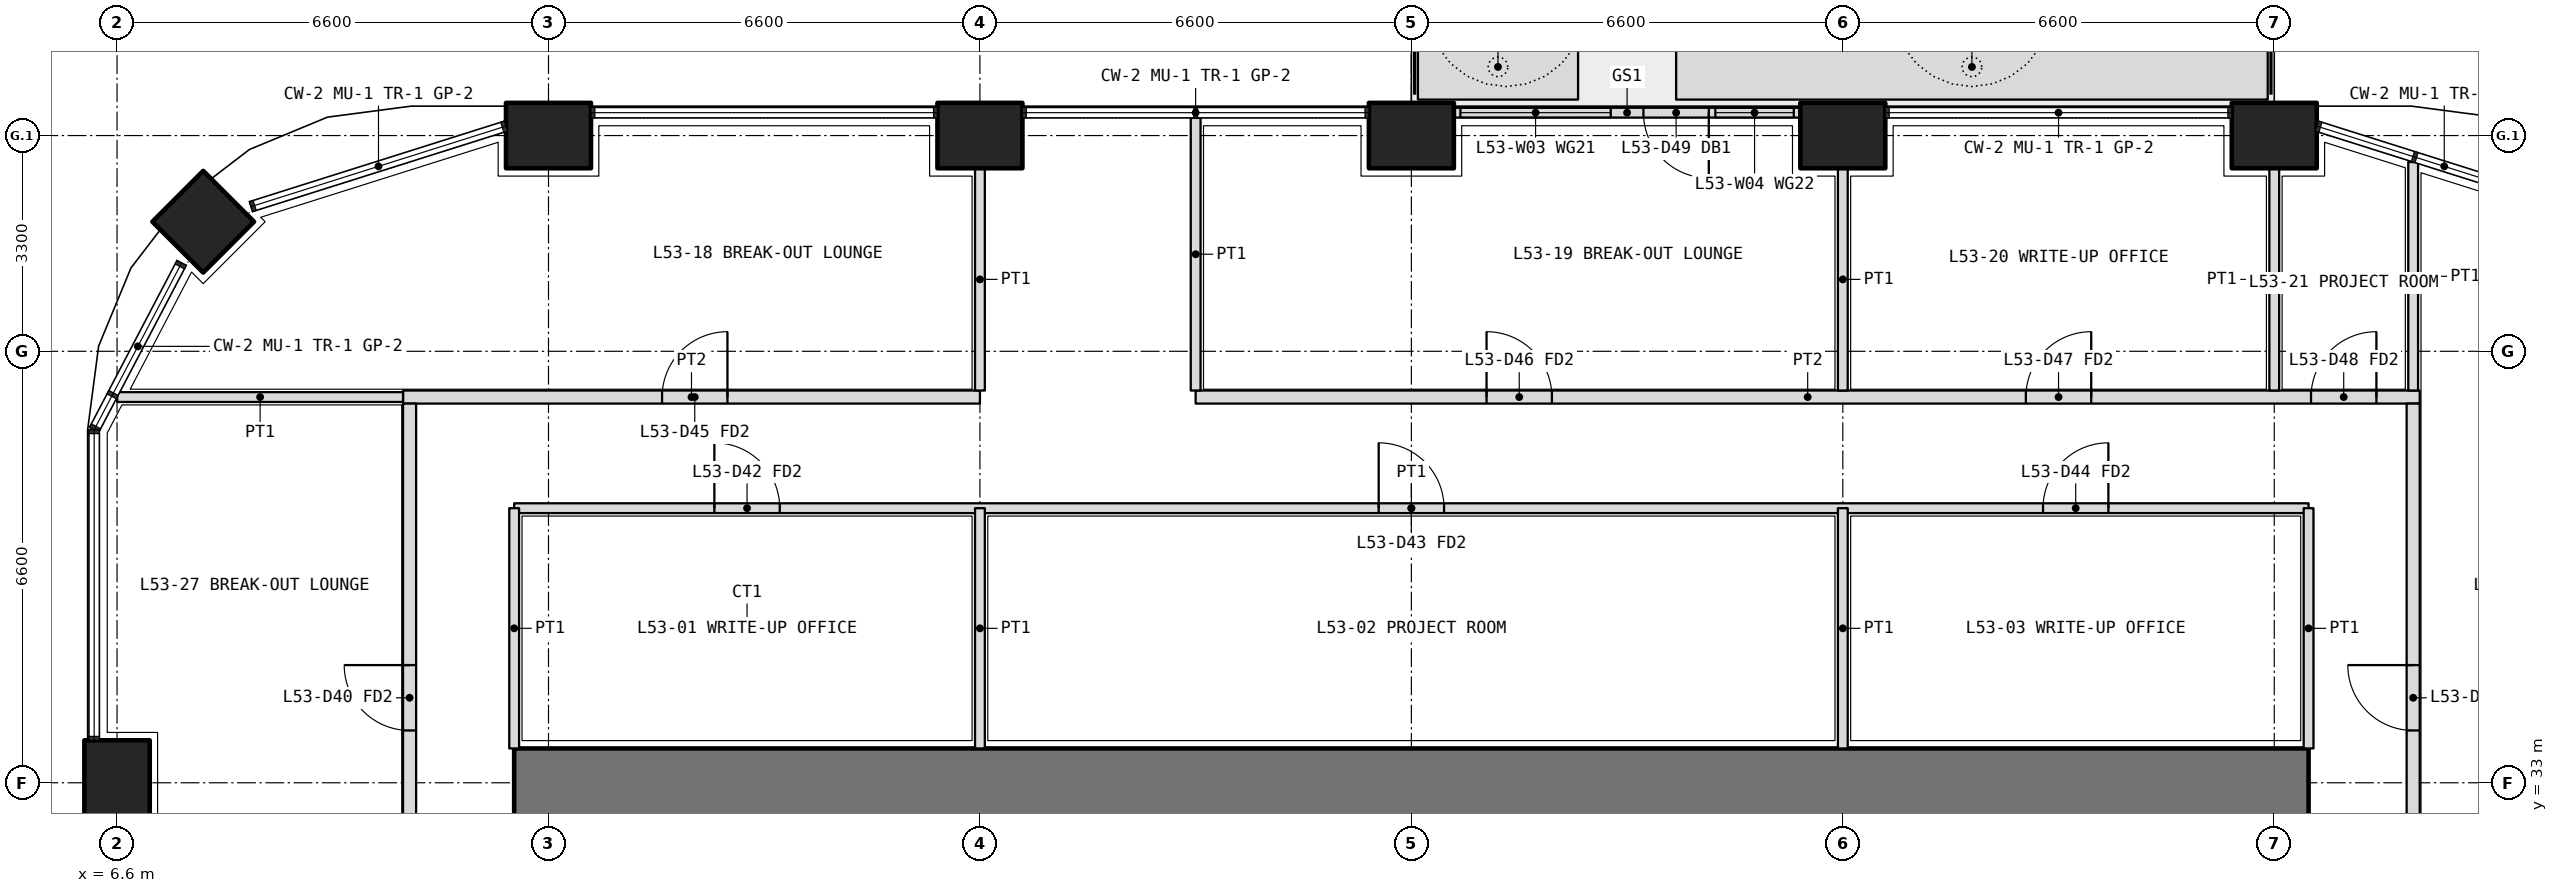
"""IFC4 building model, lengths in metres.
Left out: names, types, materials, properties, quantities, classifications, styles, units other than length and angle.
Written with IfcOpenShell. Run it as: python <this file> out.ifc"""

import sys

from ifc_helpers import new_model, si_unit, direction, frame, frame_2d, origin, origin_2d, place, context, subcontext, project, spatial, polyline, rectangle, outline, extrude, element, fill, save


model = new_model("IFC4")
c1 = context("Model", 3, precision=1e-05, world=origin(), true_north=direction((0.0, 1.0)))
c2 = subcontext(c1, "Body", "Model", "MODEL_VIEW")
j1 = project(units=[si_unit("LENGTHUNIT", "METRE"), si_unit("PLANEANGLEUNIT", "RADIAN")], contexts=[c1])
p1 = place(None, origin())
s1 = spatial("IfcSite", under=j1, at=p1, CompositionType="ELEMENT")
p2 = place(p1, origin())
s2 = spatial("IfcBuilding", under=s1, at=p2, CompositionType="ELEMENT")
p3 = place(p2, frame((0.0, 0.0, 233.4)))
s3 = spatial("IfcBuildingStorey", under=s2, at=p3, CompositionType="ELEMENT", Elevation=233.4)
p4 = place(p3, frame((7.918, 41.582, 0.0), z_axis=(0.0, 0.0, 1.0), x_axis=(0.707106781187, 0.707106781187, 0.0)))
e1 = element("IfcColumn", 1, at=p4, inside=s3, PredefinedType="COLUMN", context=c2, shape_type="SweptSolid", body=[
    extrude(rectangle(XDim=1.1, YDim=1.1, at=origin_2d()), origin(), (0.0, 0.0, 1.0), 4.2),
])
for number, where, z_axis, x_axis in (
    (2, (6.6, 33.0, 0.0), (0.0, 0.0, 1.0), (0.0, 1.0, 0.0)),
    (3, (13.2, 42.9, 0.0), (0.0, 0.0, 1.0), (1.0, 0.0, 0.0)),
    (4, (19.8, 42.9, 0.0), (0.0, 0.0, 1.0), (1.0, 0.0, 0.0)),
    (5, (26.4, 42.9, 0.0), (0.0, 0.0, 1.0), (1.0, 0.0, 0.0)),
    (6, (33.0, 42.9, 0.0), (0.0, 0.0, 1.0), (1.0, 0.0, 0.0)),
    (7, (39.6, 42.9, 0.0), (0.0, 0.0, 1.0), (1.0, 0.0, 0.0)),
):
    element("IfcColumn", number, at=place(p3, frame(where, z_axis=z_axis, x_axis=x_axis)), inside=s3, PredefinedType="COLUMN", context=c2, shape_type="SweptSolid", body=[
        extrude(rectangle(XDim=1.3, YDim=1.0, at=origin_2d()), origin(), (0.0, 0.0, 1.0), 4.2),
    ])
p5 = place(p3, origin())
e8 = element("IfcWall", 8, at=p5, inside=s3, PredefinedType="USERDEFINED", context=c2, shape_type="SweptSolid", body=[
    extrude(outline(polyline([(26.5, 43.45), (28.95, 43.45), (28.95, 44.45), (26.5, 44.45), (26.5, 43.45)]), holes=[polyline([(26.65, 43.6), (28.8, 43.6), (28.8, 44.3), (26.65, 44.3), (26.65, 43.6)])]), origin(), (0.0, 0.0, 1.0), 1.05),
])
p6 = place(p3, origin())
e9 = element("IfcWall", 9, at=p6, inside=s3, PredefinedType="USERDEFINED", context=c2, shape_type="SweptSolid", body=[
    extrude(outline(polyline([(30.45, 43.45), (39.5, 43.45), (39.5, 44.45), (30.45, 44.45), (30.45, 43.45)]), holes=[polyline([(30.6, 43.6), (39.35, 43.6), (39.35, 44.3), (30.6, 44.3), (30.6, 43.6)])]), origin(), (0.0, 0.0, 1.0), 1.05),
])
p7 = place(p3, frame((32.35, 43.25, 0.0), z_axis=(0.0, 0.0, 1.0), x_axis=(-1.0, 0.0, 0.0)))
e10 = element("IfcWall", 10, at=p7, inside=s3, PredefinedType="SOLIDWALL", context=c2, shape_type="SweptSolid", body=[
    extrude(rectangle(XDim=5.3, YDim=0.15, at=frame_2d((2.65, 0.0))), origin(), (0.0, 0.0, 1.0), 2.7),
])
p8 = place(p7, frame((1.4, 0.0, 0.0)))
e11 = element("IfcOpeningElement", 11, at=p8, cuts=e10, PredefinedType="OPENING", context=c2, shape_type="SweptSolid", body=[
    extrude(rectangle(XDim=1.0, YDim=2.4, at=frame_2d((0.5, 1.2))), frame((0.0, 0.085, 0.0), z_axis=(0.0, -1.0, 0.0), x_axis=(1.0, 0.0, 0.0)), (0.0, 0.0, 1.0), 0.17),
])
p9 = place(p7, frame((0.1, 0.0, 0.1)))
e12 = element("IfcOpeningElement", 12, at=p9, cuts=e10, PredefinedType="OPENING", context=c2, shape_type="SweptSolid", body=[
    extrude(rectangle(XDim=1.2, YDim=2.3, at=frame_2d((0.6, 1.15))), frame((0.0, 0.085, 0.0), z_axis=(0.0, -1.0, 0.0), x_axis=(1.0, 0.0, 0.0)), (0.0, 0.0, 1.0), 0.17),
])
p10 = place(p7, frame((2.9, 0.0, 0.1)))
e13 = element("IfcOpeningElement", 13, at=p10, cuts=e10, PredefinedType="OPENING", context=c2, shape_type="SweptSolid", body=[
    extrude(rectangle(XDim=2.3, YDim=2.3, at=frame_2d((1.15, 1.15))), frame((0.0, 0.085, 0.0), z_axis=(0.0, -1.0, 0.0), x_axis=(1.0, 0.0, 0.0)), (0.0, 0.0, 1.0), 0.17),
])
p11 = place(p3, frame((40.125, 33.0, 0.0), z_axis=(0.0, 0.0, 1.0), x_axis=(-1.0, 0.0, 0.0)))
e14 = element("IfcWall", 14, at=p11, inside=s3, PredefinedType="SHEAR", context=c2, shape_type="SweptSolid", body=[
    extrude(rectangle(XDim=27.45, YDim=1.05, at=frame_2d((13.725, 0.0))), origin(), (0.0, 0.0, 1.0), 4.2),
])
p12 = place(p3, frame((12.675, 37.2, 0.0), z_axis=(0.0, 0.0, 1.0), x_axis=(1.0, 0.0, 0.0)))
e15 = element("IfcWall", 15, at=p12, inside=s3, PredefinedType="PARTITIONING", context=c2, shape_type="SweptSolid", body=[
    extrude(rectangle(XDim=27.45, YDim=0.15, at=frame_2d((13.725, 0.0))), origin(), (0.0, 0.0, 1.0), 3.0),
])
p13 = place(p12, frame((3.062, 0.0, 0.0)))
e16 = element("IfcOpeningElement", 16, at=p13, cuts=e15, PredefinedType="OPENING", context=c2, shape_type="SweptSolid", body=[
    extrude(rectangle(XDim=1.0, YDim=2.1, at=frame_2d((0.5, 1.05))), frame((0.0, 0.085, 0.0), z_axis=(0.0, -1.0, 0.0), x_axis=(1.0, 0.0, 0.0)), (0.0, 0.0, 1.0), 0.17),
])
p14 = place(p12, frame((13.225, 0.0, 0.0)))
e17 = element("IfcOpeningElement", 17, at=p14, cuts=e15, PredefinedType="OPENING", context=c2, shape_type="SweptSolid", body=[
    extrude(rectangle(XDim=1.0, YDim=2.1, at=frame_2d((0.5, 1.05))), frame((0.0, 0.085, 0.0), z_axis=(0.0, -1.0, 0.0), x_axis=(1.0, 0.0, 0.0)), (0.0, 0.0, 1.0), 0.17),
])
p15 = place(p12, frame((23.387, 0.0, 0.0)))
e18 = element("IfcOpeningElement", 18, at=p15, cuts=e15, PredefinedType="OPENING", context=c2, shape_type="SweptSolid", body=[
    extrude(rectangle(XDim=1.0, YDim=2.1, at=frame_2d((0.5, 1.05))), frame((0.0, 0.085, 0.0), z_axis=(0.0, -1.0, 0.0), x_axis=(1.0, 0.0, 0.0)), (0.0, 0.0, 1.0), 0.17),
])
for number, where, z_axis, x_axis in (
    (19, (12.675, 33.525, 0.0), (0.0, 0.0, 1.0), (0.0, 1.0, 0.0)),
    (20, (40.125, 33.525, 0.0), (0.0, 0.0, 1.0), (0.0, 1.0, 0.0)),
    (21, (19.8, 33.525, 0.0), (0.0, 0.0, 1.0), (0.0, 1.0, 0.0)),
    (22, (33.0, 33.525, 0.0), (0.0, 0.0, 1.0), (0.0, 1.0, 0.0)),
):
    element("IfcWall", number, at=place(p3, frame(where, z_axis=z_axis, x_axis=x_axis)), inside=s3, PredefinedType="PARTITIONING", context=c2, shape_type="SweptSolid", body=[
        extrude(rectangle(XDim=3.675, YDim=0.15, at=frame_2d((1.837, 0.0))), origin(), (0.0, 0.0, 1.0), 3.0),
    ])
p16 = place(p3, frame((10.975, 38.9, 0.0), z_axis=(0.0, 0.0, 1.0), x_axis=(1.0, 0.0, 0.0)))
e23 = element("IfcWall", 23, at=p16, inside=s3, PredefinedType="PARTITIONING", context=c2, shape_type="SweptSolid", body=[
    extrude(rectangle(XDim=8.825, YDim=0.2, at=frame_2d((4.413, 0.0))), origin(), (0.0, 0.0, 1.0), 3.0),
])
p17 = place(p16, frame((3.962, 0.0, 0.0)))
e24 = element("IfcOpeningElement", 24, at=p17, cuts=e23, PredefinedType="OPENING", context=c2, shape_type="SweptSolid", body=[
    extrude(rectangle(XDim=1.0, YDim=2.1, at=frame_2d((0.5, 1.05))), frame((0.0, 0.11, 0.0), z_axis=(0.0, -1.0, 0.0), x_axis=(1.0, 0.0, 0.0)), (0.0, 0.0, 1.0), 0.22),
])
p18 = place(p3, frame((23.1, 38.9, 0.0), z_axis=(0.0, 0.0, 1.0), x_axis=(1.0, 0.0, 0.0)))
e25 = element("IfcWall", 25, at=p18, inside=s3, PredefinedType="PARTITIONING", context=c2, shape_type="SweptSolid", body=[
    extrude(rectangle(XDim=18.725, YDim=0.2, at=frame_2d((9.362, 0.0))), origin(), (0.0, 0.0, 1.0), 3.0),
])
p19 = place(p18, frame((4.45, 0.0, 0.0)))
e26 = element("IfcOpeningElement", 26, at=p19, cuts=e25, PredefinedType="OPENING", context=c2, shape_type="SweptSolid", body=[
    extrude(rectangle(XDim=1.0, YDim=2.1, at=frame_2d((0.5, 1.05))), frame((0.0, 0.11, 0.0), z_axis=(0.0, -1.0, 0.0), x_axis=(1.0, 0.0, 0.0)), (0.0, 0.0, 1.0), 0.22),
])
p20 = place(p18, frame((12.7, 0.0, 0.0)))
e27 = element("IfcOpeningElement", 27, at=p20, cuts=e25, PredefinedType="OPENING", context=c2, shape_type="SweptSolid", body=[
    extrude(rectangle(XDim=1.0, YDim=2.1, at=frame_2d((0.5, 1.05))), frame((0.0, 0.11, 0.0), z_axis=(0.0, -1.0, 0.0), x_axis=(1.0, 0.0, 0.0)), (0.0, 0.0, 1.0), 0.22),
])
p21 = place(p18, frame((17.062, 0.0, 0.0)))
e28 = element("IfcOpeningElement", 28, at=p21, cuts=e25, PredefinedType="OPENING", context=c2, shape_type="SweptSolid", body=[
    extrude(rectangle(XDim=1.0, YDim=2.1, at=frame_2d((0.5, 1.05))), frame((0.0, 0.11, 0.0), z_axis=(0.0, -1.0, 0.0), x_axis=(1.0, 0.0, 0.0)), (0.0, 0.0, 1.0), 0.22),
])
p22 = place(p3, frame((11.075, 7.4, 0.0), z_axis=(0.0, 0.0, 1.0), x_axis=(0.0, 1.0, 0.0)))
e29 = element("IfcWall", 29, at=p22, inside=s3, PredefinedType="PARTITIONING", context=c2, shape_type="SweptSolid", body=[
    extrude(rectangle(XDim=31.4, YDim=0.2, at=frame_2d((15.7, 0.0))), origin(), (0.0, 0.0, 1.0), 3.0),
])
p23 = place(p22, frame((2.35, 0.0, 0.0)))
e30 = element("IfcOpeningElement", 30, at=p23, cuts=e29, PredefinedType="OPENING", context=c2, shape_type="SweptSolid", body=[
    extrude(rectangle(XDim=1.0, YDim=2.1, at=frame_2d((0.5, 1.05))), frame((0.0, 0.11, 0.0), z_axis=(0.0, -1.0, 0.0), x_axis=(1.0, 0.0, 0.0)), (0.0, 0.0, 1.0), 0.22),
])
p24 = place(p22, frame((6.35, 0.0, 0.0)))
e31 = element("IfcOpeningElement", 31, at=p24, cuts=e29, PredefinedType="OPENING", context=c2, shape_type="SweptSolid", body=[
    extrude(rectangle(XDim=1.0, YDim=2.1, at=frame_2d((0.5, 1.05))), frame((0.0, 0.11, 0.0), z_axis=(0.0, -1.0, 0.0), x_axis=(1.0, 0.0, 0.0)), (0.0, 0.0, 1.0), 0.22),
])
p25 = place(p22, frame((9.45, 0.0, 0.0)))
e32 = element("IfcOpeningElement", 32, at=p25, cuts=e29, PredefinedType="OPENING", context=c2, shape_type="SweptSolid", body=[
    extrude(rectangle(XDim=0.9, YDim=2.1, at=frame_2d((0.45, 1.05))), frame((0.0, 0.11, 0.0), z_axis=(0.0, -1.0, 0.0), x_axis=(1.0, 0.0, 0.0)), (0.0, 0.0, 1.0), 0.22),
])
p26 = place(p22, frame((13.35, 0.0, 0.0)))
e33 = element("IfcOpeningElement", 33, at=p26, cuts=e29, PredefinedType="OPENING", context=c2, shape_type="SweptSolid", body=[
    extrude(rectangle(XDim=0.9, YDim=2.1, at=frame_2d((0.45, 1.05))), frame((0.0, 0.11, 0.0), z_axis=(0.0, -1.0, 0.0), x_axis=(1.0, 0.0, 0.0)), (0.0, 0.0, 1.0), 0.22),
])
p27 = place(p22, frame((18.5, 0.0, 0.0)))
e34 = element("IfcOpeningElement", 34, at=p27, cuts=e29, PredefinedType="OPENING", context=c2, shape_type="SweptSolid", body=[
    extrude(rectangle(XDim=1.0, YDim=2.1, at=frame_2d((0.5, 1.05))), frame((0.0, 0.11, 0.0), z_axis=(0.0, -1.0, 0.0), x_axis=(1.0, 0.0, 0.0)), (0.0, 0.0, 1.0), 0.22),
])
p28 = place(p22, frame((26.4, 0.0, 0.0)))
e35 = element("IfcOpeningElement", 35, at=p28, cuts=e29, PredefinedType="OPENING", context=c2, shape_type="SweptSolid", body=[
    extrude(rectangle(XDim=1.0, YDim=2.1, at=frame_2d((0.5, 1.05))), frame((0.0, 0.11, 0.0), z_axis=(0.0, -1.0, 0.0), x_axis=(1.0, 0.0, 0.0)), (0.0, 0.0, 1.0), 0.22),
])
p29 = place(p3, frame((41.725, 7.4, 0.0), z_axis=(0.0, 0.0, 1.0), x_axis=(0.0, 1.0, 0.0)))
e36 = element("IfcWall", 36, at=p29, inside=s3, PredefinedType="PARTITIONING", context=c2, shape_type="SweptSolid", body=[
    extrude(rectangle(XDim=31.4, YDim=0.2, at=frame_2d((15.7, 0.0))), origin(), (0.0, 0.0, 1.0), 3.0),
])
p30 = place(p29, frame((5.65, 0.0, 0.0)))
e37 = element("IfcOpeningElement", 37, at=p30, cuts=e36, PredefinedType="OPENING", context=c2, shape_type="SweptSolid", body=[
    extrude(rectangle(XDim=1.0, YDim=2.1, at=frame_2d((0.5, 1.05))), frame((0.0, 0.11, 0.0), z_axis=(0.0, -1.0, 0.0), x_axis=(1.0, 0.0, 0.0)), (0.0, 0.0, 1.0), 0.22),
])
p31 = place(p29, frame((13.4, 0.0, 0.0)))
e38 = element("IfcOpeningElement", 38, at=p31, cuts=e36, PredefinedType="OPENING", context=c2, shape_type="SweptSolid", body=[
    extrude(rectangle(XDim=1.0, YDim=2.1, at=frame_2d((0.5, 1.05))), frame((0.0, 0.11, 0.0), z_axis=(0.0, -1.0, 0.0), x_axis=(1.0, 0.0, 0.0)), (0.0, 0.0, 1.0), 0.22),
])
p32 = place(p29, frame((16.75, 0.0, 0.0)))
e39 = element("IfcOpeningElement", 39, at=p32, cuts=e36, PredefinedType="OPENING", context=c2, shape_type="SweptSolid", body=[
    extrude(rectangle(XDim=0.9, YDim=2.1, at=frame_2d((0.45, 1.05))), frame((0.0, 0.11, 0.0), z_axis=(0.0, -1.0, 0.0), x_axis=(1.0, 0.0, 0.0)), (0.0, 0.0, 1.0), 0.22),
])
p33 = place(p29, frame((20.15, 0.0, 0.0)))
e40 = element("IfcOpeningElement", 40, at=p33, cuts=e36, PredefinedType="OPENING", context=c2, shape_type="SweptSolid", body=[
    extrude(rectangle(XDim=1.0, YDim=2.1, at=frame_2d((0.5, 1.05))), frame((0.0, 0.11, 0.0), z_axis=(0.0, -1.0, 0.0), x_axis=(1.0, 0.0, 0.0)), (0.0, 0.0, 1.0), 0.22),
])
p34 = place(p29, frame((26.4, 0.0, 0.0)))
e41 = element("IfcOpeningElement", 41, at=p34, cuts=e36, PredefinedType="OPENING", context=c2, shape_type="SweptSolid", body=[
    extrude(rectangle(XDim=1.0, YDim=2.1, at=frame_2d((0.5, 1.05))), frame((0.0, 0.11, 0.0), z_axis=(0.0, -1.0, 0.0), x_axis=(1.0, 0.0, 0.0)), (0.0, 0.0, 1.0), 0.22),
])
p35 = place(p3, frame((41.725, 42.495, 0.0), z_axis=(0.0, 0.0, 1.0), x_axis=(0.0, -1.0, 0.0)))
e42 = element("IfcWall", 42, at=p35, inside=s3, PredefinedType="PARTITIONING", context=c2, shape_type="SweptSolid", body=[
    extrude(rectangle(XDim=3.495, YDim=0.15, at=frame_2d((1.748, 0.0))), origin(), (0.0, 0.0, 1.0), 2.7),
])
p36 = place(p3, frame((6.603, 38.9, 0.0), z_axis=(0.0, 0.0, 1.0), x_axis=(1.0, 0.0, 0.0)))
e43 = element("IfcWall", 43, at=p36, inside=s3, PredefinedType="PARTITIONING", context=c2, shape_type="SweptSolid", body=[
    extrude(rectangle(XDim=4.373, YDim=0.15, at=frame_2d((2.186, 0.0))), origin(), (0.0, 0.0, 1.0), 2.7),
])
p37 = place(p3, frame((19.8, 42.4, 0.0), z_axis=(0.0, 0.0, 1.0), x_axis=(0.0, -1.0, 0.0)))
e44 = element("IfcWall", 44, at=p37, inside=s3, PredefinedType="PARTITIONING", context=c2, shape_type="SweptSolid", body=[
    extrude(rectangle(XDim=3.4, YDim=0.15, at=frame_2d((1.7, 0.0))), origin(), (0.0, 0.0, 1.0), 3.0),
])
p38 = place(p3, frame((23.1, 43.17, 0.0), z_axis=(0.0, 0.0, 1.0), x_axis=(0.0, -1.0, 0.0)))
e45 = element("IfcWall", 45, at=p38, inside=s3, PredefinedType="PARTITIONING", context=c2, shape_type="SweptSolid", body=[
    extrude(rectangle(XDim=4.17, YDim=0.15, at=frame_2d((2.085, 0.0))), origin(), (0.0, 0.0, 1.0), 2.7),
])
for number, where, z_axis, x_axis in (
    (46, (33.0, 42.4, 0.0), (0.0, 0.0, 1.0), (0.0, -1.0, 0.0)),
    (47, (39.6, 42.4, 0.0), (0.0, 0.0, 1.0), (0.0, -1.0, 0.0)),
):
    element("IfcWall", number, at=place(p3, frame(where, z_axis=z_axis, x_axis=x_axis)), inside=s3, PredefinedType="PARTITIONING", context=c2, shape_type="SweptSolid", body=[
        extrude(rectangle(XDim=3.4, YDim=0.15, at=frame_2d((1.7, 0.0))), origin(), (0.0, 0.0, 1.0), 3.0),
    ])
p39 = place(p8, origin())
e48 = element("IfcDoor", 48, at=p39, inside=s3, OperationType="SINGLE_SWING_LEFT", PredefinedType="DOOR", context=c2, shape_type="SweptSolid", body=[
    extrude(rectangle(XDim=1.0, YDim=2.4, at=frame_2d((0.5, 1.2))), frame((0.0, 0.025, 0.0), z_axis=(0.0, -1.0, 0.0), x_axis=(1.0, 0.0, 0.0)), (0.0, 0.0, 1.0), 0.05),
])
fill(e11, e48)
p40 = place(p9, origin())
e49 = element("IfcWindow", 49, at=p40, inside=s3, PartitioningType="SINGLE_PANEL", PredefinedType="WINDOW", context=c2, shape_type="SweptSolid", body=[
    extrude(rectangle(XDim=1.2, YDim=2.3, at=frame_2d((0.6, 1.15))), frame((0.0, 0.03, 0.0), z_axis=(0.0, -1.0, 0.0), x_axis=(1.0, 0.0, 0.0)), (0.0, 0.0, 1.0), 0.06),
])
fill(e12, e49)
p41 = place(p10, origin())
e50 = element("IfcWindow", 50, at=p41, inside=s3, PartitioningType="SINGLE_PANEL", PredefinedType="WINDOW", context=c2, shape_type="SweptSolid", body=[
    extrude(rectangle(XDim=2.3, YDim=2.3, at=frame_2d((1.15, 1.15))), frame((0.0, 0.03, 0.0), z_axis=(0.0, -1.0, 0.0), x_axis=(1.0, 0.0, 0.0)), (0.0, 0.0, 1.0), 0.06),
])
fill(e13, e50)
p42 = place(p13, origin())
e51 = element("IfcDoor", 51, at=p42, inside=s3, OperationType="SINGLE_SWING_LEFT", PredefinedType="DOOR", context=c2, shape_type="SweptSolid", body=[
    extrude(rectangle(XDim=1.0, YDim=2.1, at=frame_2d((0.5, 1.05))), frame((0.0, 0.025, 0.0), z_axis=(0.0, -1.0, 0.0), x_axis=(1.0, 0.0, 0.0)), (0.0, 0.0, 1.0), 0.05),
])
fill(e16, e51)
p43 = place(p14, origin())
e52 = element("IfcDoor", 52, at=p43, inside=s3, OperationType="SINGLE_SWING_LEFT", PredefinedType="DOOR", context=c2, shape_type="SweptSolid", body=[
    extrude(rectangle(XDim=1.0, YDim=2.1, at=frame_2d((0.5, 1.05))), frame((0.0, 0.025, 0.0), z_axis=(0.0, -1.0, 0.0), x_axis=(1.0, 0.0, 0.0)), (0.0, 0.0, 1.0), 0.05),
])
fill(e17, e52)
p44 = place(p15, origin())
e53 = element("IfcDoor", 53, at=p44, inside=s3, OperationType="SINGLE_SWING_RIGHT", PredefinedType="DOOR", context=c2, shape_type="SweptSolid", body=[
    extrude(rectangle(XDim=1.0, YDim=2.1, at=frame_2d((0.5, 1.05))), frame((0.0, 0.025, 0.0), z_axis=(0.0, -1.0, 0.0), x_axis=(1.0, 0.0, 0.0)), (0.0, 0.0, 1.0), 0.05),
])
fill(e18, e53)
p45 = place(p34, origin())
e54 = element("IfcDoor", 54, at=p45, inside=s3, OperationType="SINGLE_SWING_RIGHT", PredefinedType="DOOR", context=c2, shape_type="SweptSolid", body=[
    extrude(rectangle(XDim=1.0, YDim=2.1, at=frame_2d((0.5, 1.05))), frame((0.0, 0.025, 0.0), z_axis=(0.0, -1.0, 0.0), x_axis=(1.0, 0.0, 0.0)), (0.0, 0.0, 1.0), 0.05),
])
fill(e41, e54)
p46 = place(p17, origin())
e55 = element("IfcDoor", 55, at=p46, inside=s3, OperationType="SINGLE_SWING_RIGHT", PredefinedType="DOOR", context=c2, shape_type="SweptSolid", body=[
    extrude(rectangle(XDim=1.0, YDim=2.1, at=frame_2d((0.5, 1.05))), frame((0.0, 0.025, 0.0), z_axis=(0.0, -1.0, 0.0), x_axis=(1.0, 0.0, 0.0)), (0.0, 0.0, 1.0), 0.05),
])
fill(e24, e55)
p47 = place(p19, origin())
e56 = element("IfcDoor", 56, at=p47, inside=s3, OperationType="SINGLE_SWING_LEFT", PredefinedType="DOOR", context=c2, shape_type="SweptSolid", body=[
    extrude(rectangle(XDim=1.0, YDim=2.1, at=frame_2d((0.5, 1.05))), frame((0.0, 0.025, 0.0), z_axis=(0.0, -1.0, 0.0), x_axis=(1.0, 0.0, 0.0)), (0.0, 0.0, 1.0), 0.05),
])
fill(e26, e56)
p48 = place(p20, origin())
e57 = element("IfcDoor", 57, at=p48, inside=s3, OperationType="SINGLE_SWING_RIGHT", PredefinedType="DOOR", context=c2, shape_type="SweptSolid", body=[
    extrude(rectangle(XDim=1.0, YDim=2.1, at=frame_2d((0.5, 1.05))), frame((0.0, 0.025, 0.0), z_axis=(0.0, -1.0, 0.0), x_axis=(1.0, 0.0, 0.0)), (0.0, 0.0, 1.0), 0.05),
])
fill(e27, e57)
p49 = place(p21, origin())
e58 = element("IfcDoor", 58, at=p49, inside=s3, OperationType="SINGLE_SWING_RIGHT", PredefinedType="DOOR", context=c2, shape_type="SweptSolid", body=[
    extrude(rectangle(XDim=1.0, YDim=2.1, at=frame_2d((0.5, 1.05))), frame((0.0, 0.025, 0.0), z_axis=(0.0, -1.0, 0.0), x_axis=(1.0, 0.0, 0.0)), (0.0, 0.0, 1.0), 0.05),
])
fill(e28, e58)
p50 = place(p28, origin())
e59 = element("IfcDoor", 59, at=p50, inside=s3, OperationType="SINGLE_SWING_RIGHT", PredefinedType="DOOR", context=c2, shape_type="SweptSolid", body=[
    extrude(rectangle(XDim=1.0, YDim=2.1, at=frame_2d((0.5, 1.05))), frame((0.0, 0.025, 0.0), z_axis=(0.0, -1.0, 0.0), x_axis=(1.0, 0.0, 0.0)), (0.0, 0.0, 1.0), 0.05),
])
fill(e35, e59)
save(model, sys.argv[1])
